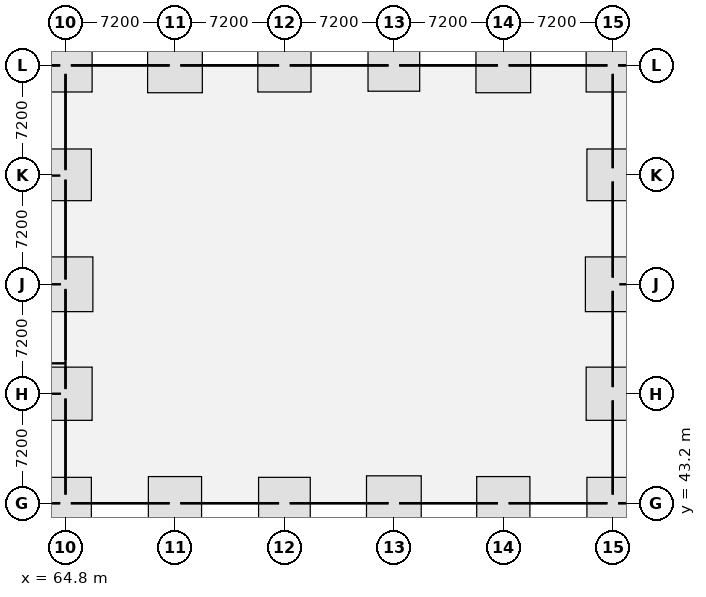
"""IFC4 building model, lengths in metres.
Left out: names, types, materials, properties, quantities, classifications, styles, units other than length and angle.
Written with IfcOpenShell. Run it as: python <this file> out.ifc"""

import sys

from ifc_helpers import new_model, si_unit, direction, frame, frame_2d, origin, origin_2d, place, context, subcontext, project, spatial, rectangle, extrude, element, fill, save


model = new_model("IFC4")
c1 = context("Model", 3, precision=1e-05, world=origin(), true_north=direction((0.0, 1.0)))
c2 = subcontext(c1, "Body", "Model", "MODEL_VIEW")
j1 = project(units=[si_unit("LENGTHUNIT", "METRE"), si_unit("PLANEANGLEUNIT", "RADIAN")], contexts=[c1])
p1 = place(None, origin())
s1 = spatial("IfcSite", under=j1, at=p1, CompositionType="ELEMENT")
p2 = place(p1, origin())
s2 = spatial("IfcBuilding", under=s1, at=p2, CompositionType="ELEMENT")
p3 = place(p2, origin())
s3 = spatial("IfcBuildingStorey", under=s2, at=p3, CompositionType="ELEMENT", Elevation=0.0)
p4 = place(p3, frame((64.8, 43.2, 0.0), z_axis=(0.0, 0.0, 1.0), x_axis=(1.0, 0.0, 0.0)))
e1 = element("IfcColumn", 1, at=p4, inside=s3, PredefinedType="PILASTER", context=c2, shape_type="SweptSolid", body=[
    extrude(rectangle(XDim=0.7, YDim=1.1, at=origin_2d()), origin(), (0.0, 0.0, 1.0), 5.4),
])
for number, where, z_axis, x_axis in (
    (2, (64.8, 50.4, 0.0), (0.0, 0.0, 1.0), (1.0, 0.0, 0.0)),
    (3, (64.8, 57.6, 0.0), (0.0, 0.0, 1.0), (1.0, 0.0, 0.0)),
    (4, (64.8, 64.8, 0.0), (0.0, 0.0, 1.0), (1.0, 0.0, 0.0)),
):
    element("IfcColumn", number, at=place(p3, frame(where, z_axis=z_axis, x_axis=x_axis)), inside=s3, PredefinedType="COLUMN", context=c2, shape_type="SweptSolid", body=[
        extrude(rectangle(XDim=0.6, YDim=0.6, at=origin_2d()), origin(), (0.0, 0.0, 1.0), 5.4),
    ])
for number, where, z_axis, x_axis in (
    (5, (64.8, 72.0, 0.0), (0.0, 0.0, 1.0), (1.0, 0.0, 0.0)),
    (6, (72.0, 43.2, 0.0), (0.0, 0.0, 1.0), (1.0, 0.0, 0.0)),
    (7, (72.0, 72.0, 0.0), (0.0, 0.0, 1.0), (1.0, 0.0, 0.0)),
    (8, (79.2, 43.2, 0.0), (0.0, 0.0, 1.0), (1.0, 0.0, 0.0)),
    (9, (79.2, 72.0, 0.0), (0.0, 0.0, 1.0), (1.0, 0.0, 0.0)),
    (10, (86.4, 43.2, 0.0), (0.0, 0.0, 1.0), (1.0, 0.0, 0.0)),
    (11, (86.4, 72.0, 0.0), (0.0, 0.0, 1.0), (1.0, 0.0, 0.0)),
    (12, (93.6, 43.2, 0.0), (0.0, 0.0, 1.0), (1.0, 0.0, 0.0)),
    (13, (93.6, 72.0, 0.0), (0.0, 0.0, 1.0), (1.0, 0.0, 0.0)),
    (14, (100.8, 43.2, 0.0), (0.0, 0.0, 1.0), (1.0, 0.0, 0.0)),
):
    element("IfcColumn", number, at=place(p3, frame(where, z_axis=z_axis, x_axis=x_axis)), inside=s3, PredefinedType="PILASTER", context=c2, shape_type="SweptSolid", body=[
        extrude(rectangle(XDim=0.7, YDim=1.1, at=origin_2d()), origin(), (0.0, 0.0, 1.0), 5.4),
    ])
for number, where, z_axis, x_axis in (
    (15, (100.8, 50.4, 0.0), (0.0, 0.0, 1.0), (1.0, 0.0, 0.0)),
    (16, (100.8, 57.6, 0.0), (0.0, 0.0, 1.0), (1.0, 0.0, 0.0)),
    (17, (100.8, 64.8, 0.0), (0.0, 0.0, 1.0), (1.0, 0.0, 0.0)),
):
    element("IfcColumn", number, at=place(p3, frame(where, z_axis=z_axis, x_axis=x_axis)), inside=s3, PredefinedType="COLUMN", context=c2, shape_type="SweptSolid", body=[
        extrude(rectangle(XDim=0.85, YDim=0.85, at=origin_2d()), origin(), (0.0, 0.0, 1.0), 5.4),
    ])
p5 = place(p3, frame((100.8, 72.0, 0.0), z_axis=(0.0, 0.0, 1.0), x_axis=(1.0, 0.0, 0.0)))
e18 = element("IfcColumn", 18, at=p5, inside=s3, PredefinedType="PILASTER", context=c2, shape_type="SweptSolid", body=[
    extrude(rectangle(XDim=0.7, YDim=1.1, at=origin_2d()), origin(), (0.0, 0.0, 1.0), 5.4),
])
p6 = place(p3, frame((107.65, 72.0, 0.0), z_axis=(0.0, 0.0, 1.0), x_axis=(-1.0, 0.0, 0.0)))
e19 = element("IfcWall", 19, at=p6, inside=s3, PredefinedType="ELEMENTEDWALL", context=c2, shape_type="SweptSolid", body=[
    extrude(rectangle(XDim=6.5, YDim=0.32, at=frame_2d((3.25, 0.0))), origin(), (0.0, 0.0, 1.0), 4.29),
])
p7 = place(p6, frame((1.15, 0.0, 0.0)))
e20 = element("IfcOpeningElement", 20, at=p7, cuts=e19, PredefinedType="OPENING", context=c2, shape_type="SweptSolid", body=[
    extrude(rectangle(XDim=4.2, YDim=3.4, at=frame_2d((2.1, 1.7))), frame((0.0, 0.172, 0.0), z_axis=(0.0, -1.0, 0.0), x_axis=(1.0, 0.0, 0.0)), (0.0, 0.0, 1.0), 0.344),
])
p8 = place(p3, frame((100.45, 72.0, 0.0), z_axis=(0.0, 0.0, 1.0), x_axis=(-1.0, 0.0, 0.0)))
e21 = element("IfcWall", 21, at=p8, inside=s3, PredefinedType="ELEMENTEDWALL", context=c2, shape_type="SweptSolid", body=[
    extrude(rectangle(XDim=6.5, YDim=0.32, at=frame_2d((3.25, 0.0))), origin(), (0.0, 0.0, 1.0), 4.49),
])
p9 = place(p8, frame((1.15, 0.0, 0.0)))
e22 = element("IfcOpeningElement", 22, at=p9, cuts=e21, PredefinedType="OPENING", context=c2, shape_type="SweptSolid", body=[
    extrude(rectangle(XDim=4.2, YDim=4.2, at=frame_2d((2.1, 2.1))), frame((0.0, 0.172, 0.0), z_axis=(0.0, -1.0, 0.0), x_axis=(1.0, 0.0, 0.0)), (0.0, 0.0, 1.0), 0.344),
])
p10 = place(p3, frame((93.25, 72.0, 0.0), z_axis=(0.0, 0.0, 1.0), x_axis=(-1.0, 0.0, 0.0)))
e23 = element("IfcWall", 23, at=p10, inside=s3, PredefinedType="ELEMENTEDWALL", context=c2, shape_type="SweptSolid", body=[
    extrude(rectangle(XDim=6.5, YDim=0.32, at=frame_2d((3.25, 0.0))), origin(), (0.0, 0.0, 1.0), 4.49),
])
p11 = place(p10, frame((1.15, 0.0, 0.0)))
e24 = element("IfcOpeningElement", 24, at=p11, cuts=e23, PredefinedType="OPENING", context=c2, shape_type="SweptSolid", body=[
    extrude(rectangle(XDim=4.2, YDim=4.2, at=frame_2d((2.1, 2.1))), frame((0.0, 0.172, 0.0), z_axis=(0.0, -1.0, 0.0), x_axis=(1.0, 0.0, 0.0)), (0.0, 0.0, 1.0), 0.344),
])
p12 = place(p3, frame((86.05, 72.0, 0.0), z_axis=(0.0, 0.0, 1.0), x_axis=(-1.0, 0.0, 0.0)))
e25 = element("IfcWall", 25, at=p12, inside=s3, PredefinedType="ELEMENTEDWALL", context=c2, shape_type="SweptSolid", body=[
    extrude(rectangle(XDim=6.5, YDim=0.32, at=frame_2d((3.25, 0.0))), origin(), (0.0, 0.0, 1.0), 4.49),
])
p13 = place(p12, frame((1.15, 0.0, 0.0)))
e26 = element("IfcOpeningElement", 26, at=p13, cuts=e25, PredefinedType="OPENING", context=c2, shape_type="SweptSolid", body=[
    extrude(rectangle(XDim=4.2, YDim=4.2, at=frame_2d((2.1, 2.1))), frame((0.0, 0.172, 0.0), z_axis=(0.0, -1.0, 0.0), x_axis=(1.0, 0.0, 0.0)), (0.0, 0.0, 1.0), 0.344),
])
p14 = place(p3, frame((78.85, 72.0, 0.0), z_axis=(0.0, 0.0, 1.0), x_axis=(-1.0, 0.0, 0.0)))
e27 = element("IfcWall", 27, at=p14, inside=s3, PredefinedType="ELEMENTEDWALL", context=c2, shape_type="SweptSolid", body=[
    extrude(rectangle(XDim=6.5, YDim=0.32, at=frame_2d((3.25, 0.0))), origin(), (0.0, 0.0, 1.0), 4.49),
])
p15 = place(p14, frame((1.15, 0.0, 0.0)))
e28 = element("IfcOpeningElement", 28, at=p15, cuts=e27, PredefinedType="OPENING", context=c2, shape_type="SweptSolid", body=[
    extrude(rectangle(XDim=4.2, YDim=4.2, at=frame_2d((2.1, 2.1))), frame((0.0, 0.172, 0.0), z_axis=(0.0, -1.0, 0.0), x_axis=(1.0, 0.0, 0.0)), (0.0, 0.0, 1.0), 0.344),
])
p16 = place(p3, frame((71.65, 72.0, 0.0), z_axis=(0.0, 0.0, 1.0), x_axis=(-1.0, 0.0, 0.0)))
e29 = element("IfcWall", 29, at=p16, inside=s3, PredefinedType="ELEMENTEDWALL", context=c2, shape_type="SweptSolid", body=[
    extrude(rectangle(XDim=6.5, YDim=0.32, at=frame_2d((3.25, 0.0))), origin(), (0.0, 0.0, 1.0), 4.49),
])
p17 = place(p16, frame((1.15, 0.0, 0.0)))
e30 = element("IfcOpeningElement", 30, at=p17, cuts=e29, PredefinedType="OPENING", context=c2, shape_type="SweptSolid", body=[
    extrude(rectangle(XDim=4.2, YDim=4.2, at=frame_2d((2.1, 2.1))), frame((0.0, 0.172, 0.0), z_axis=(0.0, -1.0, 0.0), x_axis=(1.0, 0.0, 0.0)), (0.0, 0.0, 1.0), 0.344),
])
p18 = place(p3, frame((64.45, 72.0, 0.0), z_axis=(0.0, 0.0, 1.0), x_axis=(-1.0, 0.0, 0.0)))
e31 = element("IfcWall", 31, at=p18, inside=s3, PredefinedType="ELEMENTEDWALL", context=c2, shape_type="SweptSolid", body=[
    extrude(rectangle(XDim=6.5, YDim=0.32, at=frame_2d((3.25, 0.0))), origin(), (0.0, 0.0, 1.0), 4.49),
])
p19 = place(p3, frame((57.95, 43.2, 0.0), z_axis=(0.0, 0.0, 1.0), x_axis=(1.0, 0.0, 0.0)))
e32 = element("IfcWall", 32, at=p19, inside=s3, PredefinedType="ELEMENTEDWALL", context=c2, shape_type="SweptSolid", body=[
    extrude(rectangle(XDim=6.5, YDim=0.32, at=frame_2d((3.25, 0.0))), origin(), (0.0, 0.0, 1.0), 4.49),
])
p20 = place(p19, frame((1.15, 0.0, 0.0)))
e33 = element("IfcOpeningElement", 33, at=p20, cuts=e32, PredefinedType="OPENING", context=c2, shape_type="SweptSolid", body=[
    extrude(rectangle(XDim=4.2, YDim=4.2, at=frame_2d((2.1, 2.1))), frame((0.0, 0.172, 0.0), z_axis=(0.0, -1.0, 0.0), x_axis=(1.0, 0.0, 0.0)), (0.0, 0.0, 1.0), 0.344),
])
p21 = place(p3, frame((65.15, 43.2, 0.0), z_axis=(0.0, 0.0, 1.0), x_axis=(1.0, 0.0, 0.0)))
e34 = element("IfcWall", 34, at=p21, inside=s3, PredefinedType="ELEMENTEDWALL", context=c2, shape_type="SweptSolid", body=[
    extrude(rectangle(XDim=6.5, YDim=0.32, at=frame_2d((3.25, 0.0))), origin(), (0.0, 0.0, 1.0), 4.49),
])
p22 = place(p21, frame((1.15, 0.0, 0.0)))
e35 = element("IfcOpeningElement", 35, at=p22, cuts=e34, PredefinedType="OPENING", context=c2, shape_type="SweptSolid", body=[
    extrude(rectangle(XDim=4.2, YDim=4.2, at=frame_2d((2.1, 2.1))), frame((0.0, 0.172, 0.0), z_axis=(0.0, -1.0, 0.0), x_axis=(1.0, 0.0, 0.0)), (0.0, 0.0, 1.0), 0.344),
])
p23 = place(p3, frame((72.35, 43.2, 0.0), z_axis=(0.0, 0.0, 1.0), x_axis=(1.0, 0.0, 0.0)))
e36 = element("IfcWall", 36, at=p23, inside=s3, PredefinedType="ELEMENTEDWALL", context=c2, shape_type="SweptSolid", body=[
    extrude(rectangle(XDim=6.5, YDim=0.32, at=frame_2d((3.25, 0.0))), origin(), (0.0, 0.0, 1.0), 4.49),
])
p24 = place(p23, frame((1.15, 0.0, 0.0)))
e37 = element("IfcOpeningElement", 37, at=p24, cuts=e36, PredefinedType="OPENING", context=c2, shape_type="SweptSolid", body=[
    extrude(rectangle(XDim=4.2, YDim=4.2, at=frame_2d((2.1, 2.1))), frame((0.0, 0.172, 0.0), z_axis=(0.0, -1.0, 0.0), x_axis=(1.0, 0.0, 0.0)), (0.0, 0.0, 1.0), 0.344),
])
p25 = place(p3, frame((79.55, 43.2, 0.0), z_axis=(0.0, 0.0, 1.0), x_axis=(1.0, 0.0, 0.0)))
e38 = element("IfcWall", 38, at=p25, inside=s3, PredefinedType="ELEMENTEDWALL", context=c2, shape_type="SweptSolid", body=[
    extrude(rectangle(XDim=6.5, YDim=0.32, at=frame_2d((3.25, 0.0))), origin(), (0.0, 0.0, 1.0), 4.49),
])
p26 = place(p25, frame((1.15, 0.0, 0.0)))
e39 = element("IfcOpeningElement", 39, at=p26, cuts=e38, PredefinedType="OPENING", context=c2, shape_type="SweptSolid", body=[
    extrude(rectangle(XDim=4.2, YDim=4.2, at=frame_2d((2.1, 2.1))), frame((0.0, 0.172, 0.0), z_axis=(0.0, -1.0, 0.0), x_axis=(1.0, 0.0, 0.0)), (0.0, 0.0, 1.0), 0.344),
])
p27 = place(p3, frame((86.75, 43.2, 0.0), z_axis=(0.0, 0.0, 1.0), x_axis=(1.0, 0.0, 0.0)))
e40 = element("IfcWall", 40, at=p27, inside=s3, PredefinedType="ELEMENTEDWALL", context=c2, shape_type="SweptSolid", body=[
    extrude(rectangle(XDim=6.5, YDim=0.32, at=frame_2d((3.25, 0.0))), origin(), (0.0, 0.0, 1.0), 4.49),
])
p28 = place(p27, frame((1.15, 0.0, 0.0)))
e41 = element("IfcOpeningElement", 41, at=p28, cuts=e40, PredefinedType="OPENING", context=c2, shape_type="SweptSolid", body=[
    extrude(rectangle(XDim=4.2, YDim=4.2, at=frame_2d((2.1, 2.1))), frame((0.0, 0.172, 0.0), z_axis=(0.0, -1.0, 0.0), x_axis=(1.0, 0.0, 0.0)), (0.0, 0.0, 1.0), 0.344),
])
p29 = place(p3, frame((93.95, 43.2, 0.0), z_axis=(0.0, 0.0, 1.0), x_axis=(1.0, 0.0, 0.0)))
e42 = element("IfcWall", 42, at=p29, inside=s3, PredefinedType="ELEMENTEDWALL", context=c2, shape_type="SweptSolid", body=[
    extrude(rectangle(XDim=6.5, YDim=0.32, at=frame_2d((3.25, 0.0))), origin(), (0.0, 0.0, 1.0), 4.49),
])
p30 = place(p29, frame((1.15, 0.0, 0.0)))
e43 = element("IfcOpeningElement", 43, at=p30, cuts=e42, PredefinedType="OPENING", context=c2, shape_type="SweptSolid", body=[
    extrude(rectangle(XDim=4.2, YDim=4.2, at=frame_2d((2.1, 2.1))), frame((0.0, 0.172, 0.0), z_axis=(0.0, -1.0, 0.0), x_axis=(1.0, 0.0, 0.0)), (0.0, 0.0, 1.0), 0.344),
])
p31 = place(p3, frame((101.15, 43.2, 0.0), z_axis=(0.0, 0.0, 1.0), x_axis=(1.0, 0.0, 0.0)))
e44 = element("IfcWall", 44, at=p31, inside=s3, PredefinedType="ELEMENTEDWALL", context=c2, shape_type="SweptSolid", body=[
    extrude(rectangle(XDim=6.5, YDim=0.32, at=frame_2d((3.25, 0.0))), origin(), (0.0, 0.0, 1.0), 4.29),
])
p32 = place(p31, frame((1.15, 0.0, 0.0)))
e45 = element("IfcOpeningElement", 45, at=p32, cuts=e44, PredefinedType="OPENING", context=c2, shape_type="SweptSolid", body=[
    extrude(rectangle(XDim=4.2, YDim=3.4, at=frame_2d((2.1, 1.7))), frame((0.0, 0.172, 0.0), z_axis=(0.0, -1.0, 0.0), x_axis=(1.0, 0.0, 0.0)), (0.0, 0.0, 1.0), 0.344),
])
p33 = place(p3, frame((57.82, 52.4, 0.0), z_axis=(0.0, 0.0, 1.0), x_axis=(1.0, 0.0, 0.0)))
e46 = element("IfcWall", 46, at=p33, inside=s3, PredefinedType="STANDARD", context=c2, shape_type="SweptSolid", body=[
    extrude(rectangle(XDim=6.98, YDim=0.22, at=frame_2d((3.49, 0.0))), origin(), (0.0, 0.0, 1.0), 4.488),
])
p34 = place(p33, frame((2.99, 0.0, 0.0)))
e47 = element("IfcOpeningElement", 47, at=p34, cuts=e46, PredefinedType="OPENING", context=c2, shape_type="SweptSolid", body=[
    extrude(rectangle(XDim=1.0, YDim=2.15, at=frame_2d((0.5, 1.075))), frame((0.0, 0.122, 0.0), z_axis=(0.0, -1.0, 0.0), x_axis=(1.0, 0.0, 0.0)), (0.0, 0.0, 1.0), 0.244),
])
p35 = place(p3, frame((64.8, 43.79, 0.0), z_axis=(0.0, 0.0, 1.0), x_axis=(0.0, 1.0, 0.0)))
e48 = element("IfcWall", 48, at=p35, inside=s3, PredefinedType="STANDARD", context=c2, shape_type="SweptSolid", body=[
    extrude(rectangle(XDim=6.27, YDim=0.22, at=frame_2d((3.135, 0.0))), origin(), (0.0, 0.0, 1.0), 4.538),
])
p36 = place(p3, frame((64.8, 50.74, 0.0), z_axis=(0.0, 0.0, 1.0), x_axis=(0.0, 1.0, 0.0)))
e49 = element("IfcWall", 49, at=p36, inside=s3, PredefinedType="STANDARD", context=c2, shape_type="SweptSolid", body=[
    extrude(rectangle(XDim=1.44, YDim=0.22, at=frame_2d((0.72, 0.0))), origin(), (0.0, 0.0, 1.0), 4.488),
])
p37 = place(p3, frame((61.496, 64.75, 0.0), z_axis=(0.0, 0.0, 1.0), x_axis=(1.0, 0.0, 0.0)))
e50 = element("IfcWall", 50, at=p37, inside=s3, PredefinedType="PARTITIONING", context=c2, shape_type="SweptSolid", body=[
    extrude(rectangle(XDim=2.964, YDim=0.1, at=frame_2d((1.482, 0.0))), origin(), (0.0, 0.0, 1.0), 5.12),
])
p38 = place(p37, frame((0.982, 0.0, 0.0)))
e51 = element("IfcOpeningElement", 51, at=p38, cuts=e50, PredefinedType="OPENING", context=c2, shape_type="SweptSolid", body=[
    extrude(rectangle(XDim=1.0, YDim=2.15, at=frame_2d((0.5, 1.075))), frame((0.0, 0.062, 0.0), z_axis=(0.0, -1.0, 0.0), x_axis=(1.0, 0.0, 0.0)), (0.0, 0.0, 1.0), 0.124),
])
p39 = place(p3, frame((64.8, 65.14, 0.0), z_axis=(0.0, 0.0, 1.0), x_axis=(0.0, 1.0, 0.0)))
e52 = element("IfcWall", 52, at=p39, inside=s3, PredefinedType="PARTITIONING", context=c2, shape_type="SweptSolid", body=[
    extrude(rectangle(XDim=6.27, YDim=0.1, at=frame_2d((3.135, 0.0))), origin(), (0.0, 0.0, 1.0), 4.488),
])
p40 = place(p3, frame((100.8, 43.79, 0.0), z_axis=(0.0, 0.0, 1.0), x_axis=(0.0, 1.0, 0.0)))
e53 = element("IfcWall", 53, at=p40, inside=s3, PredefinedType="STANDARD", context=c2, shape_type="SweptSolid", body=[
    extrude(rectangle(XDim=6.145, YDim=0.22, at=frame_2d((3.073, 0.0))), origin(), (0.0, 0.0, 1.0), 4.338),
])
p41 = place(p3, frame((100.8, 50.865, 0.0), z_axis=(0.0, 0.0, 1.0), x_axis=(0.0, 1.0, 0.0)))
e54 = element("IfcWall", 54, at=p41, inside=s3, PredefinedType="STANDARD", context=c2, shape_type="SweptSolid", body=[
    extrude(rectangle(XDim=6.27, YDim=0.22, at=frame_2d((3.135, 0.0))), origin(), (0.0, 0.0, 1.0), 4.288),
])
p42 = place(p3, frame((100.8, 58.065, 0.0), z_axis=(0.0, 0.0, 1.0), x_axis=(0.0, 1.0, 0.0)))
e55 = element("IfcWall", 55, at=p42, inside=s3, PredefinedType="STANDARD", context=c2, shape_type="SweptSolid", body=[
    extrude(rectangle(XDim=6.27, YDim=0.22, at=frame_2d((3.135, 0.0))), origin(), (0.0, 0.0, 1.0), 4.338),
])
p43 = place(p3, frame((100.8, 65.265, 0.0), z_axis=(0.0, 0.0, 1.0), x_axis=(0.0, 1.0, 0.0)))
e56 = element("IfcWall", 56, at=p43, inside=s3, PredefinedType="STANDARD", context=c2, shape_type="SweptSolid", body=[
    extrude(rectangle(XDim=6.145, YDim=0.22, at=frame_2d((3.073, 0.0))), origin(), (0.0, 0.0, 1.0), 4.288),
])
p44 = place(p3, frame((64.8, 52.62, 0.0), z_axis=(0.0, 0.0, 1.0), x_axis=(0.0, 1.0, 0.0)))
e57 = element("IfcWall", 57, at=p44, inside=s3, PredefinedType="STANDARD", context=c2, shape_type="SweptSolid", body=[
    extrude(rectangle(XDim=4.64, YDim=0.22, at=frame_2d((2.32, 0.0))), origin(), (0.0, 0.0, 1.0), 4.488),
])
p45 = place(p44, frame((1.82, 0.0, 0.0)))
e58 = element("IfcOpeningElement", 58, at=p45, cuts=e57, PredefinedType="OPENING", context=c2, shape_type="SweptSolid", body=[
    extrude(rectangle(XDim=1.0, YDim=2.15, at=frame_2d((0.5, 1.075))), frame((0.0, 0.122, 0.0), z_axis=(0.0, -1.0, 0.0), x_axis=(1.0, 0.0, 0.0)), (0.0, 0.0, 1.0), 0.244),
])
p46 = place(p3, frame((64.8, 57.94, 0.0), z_axis=(0.0, 0.0, 1.0), x_axis=(0.0, 1.0, 0.0)))
e59 = element("IfcWall", 59, at=p46, inside=s3, PredefinedType="STANDARD", context=c2, shape_type="SweptSolid", body=[
    extrude(rectangle(XDim=6.52, YDim=0.22, at=frame_2d((3.26, 0.0))), origin(), (0.0, 0.0, 1.0), 4.538),
])
p47 = place(p9, frame((4.2, 0.0, 0.0), z_axis=(0.0, 0.0, 1.0), x_axis=(-1.0, 0.0, 0.0)))
e60 = element("IfcDoor", 60, at=p47, inside=s3, OperationType="DOUBLE_SWING_LEFT", PredefinedType="DOOR", context=c2, shape_type="SweptSolid", body=[
    extrude(rectangle(XDim=4.2, YDim=4.2, at=frame_2d((2.1, 2.1))), frame((0.0, 0.025, 0.0), z_axis=(0.0, -1.0, 0.0), x_axis=(1.0, 0.0, 0.0)), (0.0, 0.0, 1.0), 0.05),
])
fill(e22, e60)
p48 = place(p11, frame((4.2, 0.0, 0.0), z_axis=(0.0, 0.0, 1.0), x_axis=(-1.0, 0.0, 0.0)))
e61 = element("IfcDoor", 61, at=p48, inside=s3, OperationType="DOUBLE_SWING_LEFT", PredefinedType="DOOR", context=c2, shape_type="SweptSolid", body=[
    extrude(rectangle(XDim=4.2, YDim=4.2, at=frame_2d((2.1, 2.1))), frame((0.0, 0.025, 0.0), z_axis=(0.0, -1.0, 0.0), x_axis=(1.0, 0.0, 0.0)), (0.0, 0.0, 1.0), 0.05),
])
fill(e24, e61)
p49 = place(p13, frame((4.2, 0.0, 0.0), z_axis=(0.0, 0.0, 1.0), x_axis=(-1.0, 0.0, 0.0)))
e62 = element("IfcDoor", 62, at=p49, inside=s3, OperationType="DOUBLE_SWING_LEFT", PredefinedType="DOOR", context=c2, shape_type="SweptSolid", body=[
    extrude(rectangle(XDim=4.2, YDim=4.2, at=frame_2d((2.1, 2.1))), frame((0.0, 0.025, 0.0), z_axis=(0.0, -1.0, 0.0), x_axis=(1.0, 0.0, 0.0)), (0.0, 0.0, 1.0), 0.05),
])
fill(e26, e62)
p50 = place(p15, frame((4.2, 0.0, 0.0), z_axis=(0.0, 0.0, 1.0), x_axis=(-1.0, 0.0, 0.0)))
e63 = element("IfcDoor", 63, at=p50, inside=s3, OperationType="DOUBLE_SWING_LEFT", PredefinedType="DOOR", context=c2, shape_type="SweptSolid", body=[
    extrude(rectangle(XDim=4.2, YDim=4.2, at=frame_2d((2.1, 2.1))), frame((0.0, 0.025, 0.0), z_axis=(0.0, -1.0, 0.0), x_axis=(1.0, 0.0, 0.0)), (0.0, 0.0, 1.0), 0.05),
])
fill(e28, e63)
p51 = place(p17, frame((4.2, 0.0, 0.0), z_axis=(0.0, 0.0, 1.0), x_axis=(-1.0, 0.0, 0.0)))
e64 = element("IfcDoor", 64, at=p51, inside=s3, OperationType="DOUBLE_SWING_LEFT", PredefinedType="DOOR", context=c2, shape_type="SweptSolid", body=[
    extrude(rectangle(XDim=4.2, YDim=4.2, at=frame_2d((2.1, 2.1))), frame((0.0, 0.025, 0.0), z_axis=(0.0, -1.0, 0.0), x_axis=(1.0, 0.0, 0.0)), (0.0, 0.0, 1.0), 0.05),
])
fill(e30, e64)
p52 = place(p22, frame((4.2, 0.0, 0.0), z_axis=(0.0, 0.0, 1.0), x_axis=(-1.0, 0.0, 0.0)))
e65 = element("IfcDoor", 65, at=p52, inside=s3, OperationType="DOUBLE_SWING_LEFT", PredefinedType="DOOR", context=c2, shape_type="SweptSolid", body=[
    extrude(rectangle(XDim=4.2, YDim=4.2, at=frame_2d((2.1, 2.1))), frame((0.0, 0.025, 0.0), z_axis=(0.0, -1.0, 0.0), x_axis=(1.0, 0.0, 0.0)), (0.0, 0.0, 1.0), 0.05),
])
fill(e35, e65)
p53 = place(p24, frame((4.2, 0.0, 0.0), z_axis=(0.0, 0.0, 1.0), x_axis=(-1.0, 0.0, 0.0)))
e66 = element("IfcDoor", 66, at=p53, inside=s3, OperationType="DOUBLE_SWING_LEFT", PredefinedType="DOOR", context=c2, shape_type="SweptSolid", body=[
    extrude(rectangle(XDim=4.2, YDim=4.2, at=frame_2d((2.1, 2.1))), frame((0.0, 0.025, 0.0), z_axis=(0.0, -1.0, 0.0), x_axis=(1.0, 0.0, 0.0)), (0.0, 0.0, 1.0), 0.05),
])
fill(e37, e66)
p54 = place(p26, frame((4.2, 0.0, 0.0), z_axis=(0.0, 0.0, 1.0), x_axis=(-1.0, 0.0, 0.0)))
e67 = element("IfcDoor", 67, at=p54, inside=s3, OperationType="DOUBLE_SWING_LEFT", PredefinedType="DOOR", context=c2, shape_type="SweptSolid", body=[
    extrude(rectangle(XDim=4.2, YDim=4.2, at=frame_2d((2.1, 2.1))), frame((0.0, 0.025, 0.0), z_axis=(0.0, -1.0, 0.0), x_axis=(1.0, 0.0, 0.0)), (0.0, 0.0, 1.0), 0.05),
])
fill(e39, e67)
p55 = place(p28, frame((4.2, 0.0, 0.0), z_axis=(0.0, 0.0, 1.0), x_axis=(-1.0, 0.0, 0.0)))
e68 = element("IfcDoor", 68, at=p55, inside=s3, OperationType="DOUBLE_SWING_LEFT", PredefinedType="DOOR", context=c2, shape_type="SweptSolid", body=[
    extrude(rectangle(XDim=4.2, YDim=4.2, at=frame_2d((2.1, 2.1))), frame((0.0, 0.025, 0.0), z_axis=(0.0, -1.0, 0.0), x_axis=(1.0, 0.0, 0.0)), (0.0, 0.0, 1.0), 0.05),
])
fill(e41, e68)
p56 = place(p30, frame((4.2, 0.0, 0.0), z_axis=(0.0, 0.0, 1.0), x_axis=(-1.0, 0.0, 0.0)))
e69 = element("IfcDoor", 69, at=p56, inside=s3, OperationType="DOUBLE_SWING_LEFT", PredefinedType="DOOR", context=c2, shape_type="SweptSolid", body=[
    extrude(rectangle(XDim=4.2, YDim=4.2, at=frame_2d((2.1, 2.1))), frame((0.0, 0.025, 0.0), z_axis=(0.0, -1.0, 0.0), x_axis=(1.0, 0.0, 0.0)), (0.0, 0.0, 1.0), 0.05),
])
fill(e43, e69)
p57 = place(p45, origin())
e70 = element("IfcDoor", 70, at=p57, inside=s3, OperationType="SINGLE_SWING_LEFT", PredefinedType="DOOR", context=c2, shape_type="SweptSolid", body=[
    extrude(rectangle(XDim=1.0, YDim=2.15, at=frame_2d((0.5, 1.075))), frame((0.0, 0.025, 0.0), z_axis=(0.0, -1.0, 0.0), x_axis=(1.0, 0.0, 0.0)), (0.0, 0.0, 1.0), 0.05),
])
fill(e58, e70)
save(model, sys.argv[1])
